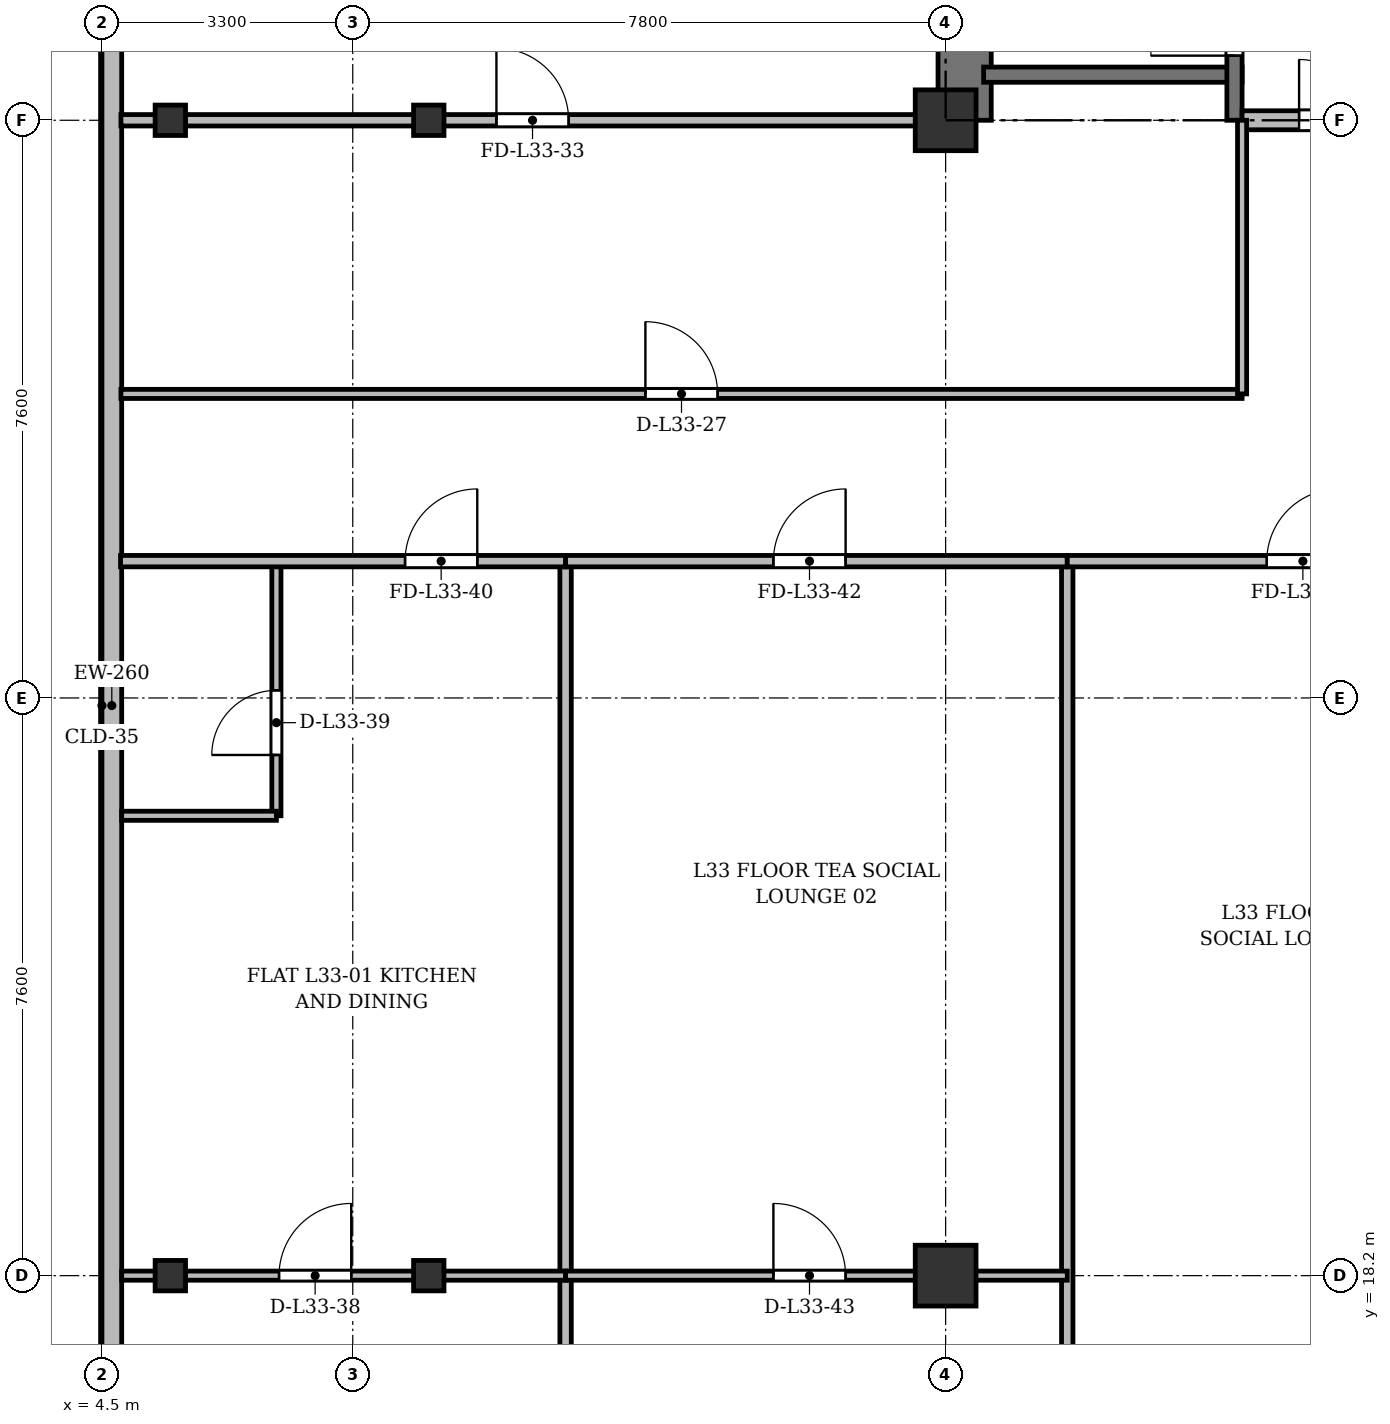
"""IFC4 building model, lengths in metres.
Left out: names, types, materials, properties, quantities, classifications, styles, units other than length and angle.
Written with IfcOpenShell. Run it as: python <this file> out.ifc"""

import sys

from ifc_helpers import new_model, si_unit, direction, frame, frame_2d, origin, origin_2d, place, context, subcontext, project, spatial, rectangle, i_section, extrude, source, transform, mapped, element, fill, save


model = new_model("IFC4")
c1 = context("Model", 3, precision=1e-05, world=origin(), true_north=direction((0.0, 1.0)))
c2 = subcontext(c1, "Body", "Model", "MODEL_VIEW")
j1 = project(units=[si_unit("LENGTHUNIT", "METRE"), si_unit("PLANEANGLEUNIT", "RADIAN")], contexts=[c1])
p1 = place(None, origin())
s1 = spatial("IfcSite", under=j1, at=p1, CompositionType="ELEMENT")
p2 = place(p1, origin())
s2 = spatial("IfcBuilding", under=s1, at=p2, CompositionType="ELEMENT")
p3 = place(p2, frame((0.0, 0.0, 128.5)))
s3 = spatial("IfcBuildingStorey", under=s2, at=p3, CompositionType="ELEMENT", Elevation=128.5)
m1 = source(origin(), c2, "Body", "SweptSolid", [
    extrude(i_section(OverallWidth=0.4, OverallDepth=0.4, WebThickness=0.022, FlangeThickness=0.035, at=origin_2d()), origin(), (0.0, 0.0, 1.0), 3.6),
])
for number, where, z_axis, x_axis in (
    (1, (5.4, 18.2, 0.0), (0.0, 0.0, 1.0), (1.0, 0.0, 0.0)),
    (2, (5.4, 33.4, 0.0), (0.0, 0.0, 1.0), (1.0, 0.0, 0.0)),
    (3, (8.8, 18.2, 0.0), (0.0, 0.0, 1.0), (1.0, 0.0, 0.0)),
    (4, (8.8, 33.4, 0.0), (0.0, 0.0, 1.0), (1.0, 0.0, 0.0)),
):
    element("IfcColumn", number, at=place(p3, frame(where, z_axis=z_axis, x_axis=x_axis)), inside=s3, PredefinedType="COLUMN", context=c2, shape_type="MappedRepresentation", body=[
        mapped(m1, transform((0.0, 0.0, 0.0), x_axis=(1.0, 0.0, 0.0), y_axis=(0.0, 1.0, 0.0), z_axis=(0.0, 0.0, 1.0), scale=1.0)),
    ])
m2 = source(origin(), c2, "Body", "SweptSolid", [
    extrude(rectangle(XDim=0.8, YDim=0.8, at=origin_2d()), origin(), (0.0, 0.0, 1.0), 3.6),
])
for number, where, z_axis, x_axis in (
    (5, (15.6, 18.2, 0.0), (0.0, 0.0, 1.0), (1.0, 0.0, 0.0)),
    (6, (15.6, 33.4, 0.0), (0.0, 0.0, 1.0), (1.0, 0.0, 0.0)),
):
    element("IfcColumn", number, at=place(p3, frame(where, z_axis=z_axis, x_axis=x_axis)), inside=s3, PredefinedType="COLUMN", context=c2, shape_type="MappedRepresentation", body=[
        mapped(m2, transform((0.0, 0.0, 0.0), x_axis=(1.0, 0.0, 0.0), y_axis=(0.0, 1.0, 0.0), z_axis=(0.0, 0.0, 1.0), scale=1.0)),
    ])
p4 = place(p3, frame((4.63, 5.9, 0.0), z_axis=(0.0, 0.0, 1.0), x_axis=(0.0, 1.0, 0.0)))
e7 = element("IfcWall", 7, at=p4, inside=s3, PredefinedType="SOLIDWALL", context=c2, shape_type="SweptSolid", body=[
    extrude(rectangle(XDim=39.6, YDim=0.26, at=frame_2d((19.8, 0.0))), origin(), (0.0, 0.0, 1.0), 2.632),
])
p5 = place(p4, frame((1.45, 0.0, 0.92)))
e8 = element("IfcOpeningElement", 8, at=p5, cuts=e7, PredefinedType="OPENING", context=c2, shape_type="SweptSolid", body=[
    extrude(rectangle(XDim=1.2, YDim=1.61, at=frame_2d((0.6, 0.805))), frame((0.0, 0.14, 0.0), z_axis=(0.0, -1.0, 0.0), x_axis=(1.0, 0.0, 0.0)), (0.0, 0.0, 1.0), 0.28),
])
p6 = place(p4, frame((4.3, 0.0, 0.92)))
e9 = element("IfcOpeningElement", 9, at=p6, cuts=e7, PredefinedType="OPENING", context=c2, shape_type="SweptSolid", body=[
    extrude(rectangle(XDim=2.4, YDim=1.61, at=frame_2d((1.2, 0.805))), frame((0.0, 0.14, 0.0), z_axis=(0.0, -1.0, 0.0), x_axis=(1.0, 0.0, 0.0)), (0.0, 0.0, 1.0), 0.28),
])
p7 = place(p4, frame((8.5, 0.0, 0.92)))
e10 = element("IfcOpeningElement", 10, at=p7, cuts=e7, PredefinedType="OPENING", context=c2, shape_type="SweptSolid", body=[
    extrude(rectangle(XDim=2.4, YDim=1.61, at=frame_2d((1.2, 0.805))), frame((0.0, 0.14, 0.0), z_axis=(0.0, -1.0, 0.0), x_axis=(1.0, 0.0, 0.0)), (0.0, 0.0, 1.0), 0.28),
])
p8 = place(p4, frame((29.7, 0.0, 0.92)))
e11 = element("IfcOpeningElement", 11, at=p8, cuts=e7, PredefinedType="OPENING", context=c2, shape_type="SweptSolid", body=[
    extrude(rectangle(XDim=2.4, YDim=1.61, at=frame_2d((1.2, 0.805))), frame((0.0, 0.14, 0.0), z_axis=(0.0, -1.0, 0.0), x_axis=(1.0, 0.0, 0.0)), (0.0, 0.0, 1.0), 0.28),
])
p9 = place(p4, frame((37.25, 0.0, 0.92)))
e12 = element("IfcOpeningElement", 12, at=p9, cuts=e7, PredefinedType="OPENING", context=c2, shape_type="SweptSolid", body=[
    extrude(rectangle(XDim=1.2, YDim=1.61, at=frame_2d((0.6, 0.805))), frame((0.0, 0.14, 0.0), z_axis=(0.0, -1.0, 0.0), x_axis=(1.0, 0.0, 0.0)), (0.0, 0.0, 1.0), 0.28),
])
p10 = place(p3, frame((15.85, 33.4, 0.0), z_axis=(0.0, 0.0, 1.0), x_axis=(0.0, 1.0, 0.0)))
e13 = element("IfcWall", 13, at=p10, inside=s3, PredefinedType="SHEAR", context=c2, shape_type="SweptSolid", body=[
    extrude(rectangle(XDim=11.7, YDim=0.7, at=frame_2d((5.85, 0.0))), origin(), (0.0, 0.0, 1.0), 3.22),
])
p11 = place(p3, frame((16.1, 34.0, 0.0), z_axis=(0.0, 0.0, 1.0), x_axis=(1.0, 0.0, 0.0)))
e14 = element("IfcWall", 14, at=p11, inside=s3, PredefinedType="SHEAR", context=c2, shape_type="SweptSolid", body=[
    extrude(rectangle(XDim=3.4, YDim=0.2, at=frame_2d((1.7, 0.0))), origin(), (0.0, 0.0, 1.0), 3.22),
])
p12 = place(p3, frame((19.4, 33.4, 0.0), z_axis=(0.0, 0.0, 1.0), x_axis=(0.0, 1.0, 0.0)))
e15 = element("IfcWall", 15, at=p12, inside=s3, PredefinedType="SHEAR", context=c2, shape_type="SweptSolid", body=[
    extrude(rectangle(XDim=11.1, YDim=0.2, at=frame_2d((5.55, 0.0))), origin(), (0.0, 0.0, 1.0), 3.22),
])
p13 = place(p12, frame((0.85, 0.0, 0.0)))
e16 = element("IfcOpeningElement", 16, at=p13, cuts=e15, PredefinedType="OPENING", context=c2, shape_type="SweptSolid", body=[
    extrude(rectangle(XDim=1.1, YDim=2.15, at=frame_2d((0.55, 1.075))), frame((0.0, 0.11, 0.0), z_axis=(0.0, -1.0, 0.0), x_axis=(1.0, 0.0, 0.0)), (0.0, 0.0, 1.0), 0.22),
])
p14 = place(p3, frame((19.5, 33.4, 0.0), z_axis=(0.0, 0.0, 1.0), x_axis=(1.0, 0.0, 0.0)))
e17 = element("IfcWall", 17, at=p14, inside=s3, PredefinedType="PARTITIONING", context=c2, shape_type="SweptSolid", body=[
    extrude(rectangle(XDim=6.8, YDim=0.25, at=frame_2d((3.4, 0.0))), origin(), (0.0, 0.0, 1.0), 2.632),
])
p15 = place(p14, frame((0.75, 0.0, 0.0)))
e18 = element("IfcOpeningElement", 18, at=p15, cuts=e17, PredefinedType="OPENING", context=c2, shape_type="SweptSolid", body=[
    extrude(rectangle(XDim=1.6, YDim=2.2, at=frame_2d((0.8, 1.1))), frame((0.0, 0.135, 0.0), z_axis=(0.0, -1.0, 0.0), x_axis=(1.0, 0.0, 0.0)), (0.0, 0.0, 1.0), 0.27),
])
p16 = place(p3, frame((4.75, 29.8, 0.0), z_axis=(0.0, 0.0, 1.0), x_axis=(1.0, 0.0, 0.0)))
e19 = element("IfcWall", 19, at=p16, inside=s3, PredefinedType="PARTITIONING", context=c2, shape_type="SweptSolid", body=[
    extrude(rectangle(XDim=14.75, YDim=0.12, at=frame_2d((7.375, 0.0))), origin(), (0.0, 0.0, 1.0), 2.72),
])
p17 = place(p16, frame((6.9, 0.0, 0.0)))
e20 = element("IfcOpeningElement", 20, at=p17, cuts=e19, PredefinedType="OPENING", context=c2, shape_type="SweptSolid", body=[
    extrude(rectangle(XDim=0.95, YDim=2.15, at=frame_2d((0.475, 1.075))), frame((0.0, 0.07, 0.0), z_axis=(0.0, -1.0, 0.0), x_axis=(1.0, 0.0, 0.0)), (0.0, 0.0, 1.0), 0.14),
])
p18 = place(p3, frame((19.5, 29.8, 0.0), z_axis=(0.0, 0.0, 1.0), x_axis=(0.0, 1.0, 0.0)))
e21 = element("IfcWall", 21, at=p18, inside=s3, PredefinedType="PARTITIONING", context=c2, shape_type="SweptSolid", body=[
    extrude(rectangle(XDim=3.6, YDim=0.12, at=frame_2d((1.8, 0.0))), origin(), (0.0, 0.0, 1.0), 2.632),
])
p19 = place(p3, frame((4.75, 33.4, 0.0), z_axis=(0.0, 0.0, 1.0), x_axis=(1.0, 0.0, 0.0)))
e22 = element("IfcWall", 22, at=p19, inside=s3, PredefinedType="PARTITIONING", context=c2, shape_type="SweptSolid", body=[
    extrude(rectangle(XDim=10.85, YDim=0.15, at=frame_2d((5.425, 0.0))), origin(), (0.0, 0.0, 1.0), 2.632),
])
p20 = place(p19, frame((4.94, 0.0, 0.0)))
e23 = element("IfcOpeningElement", 23, at=p20, cuts=e22, PredefinedType="OPENING", context=c2, shape_type="SweptSolid", body=[
    extrude(rectangle(XDim=0.95, YDim=2.15, at=frame_2d((0.475, 1.075))), frame((0.0, 0.085, 0.0), z_axis=(0.0, -1.0, 0.0), x_axis=(1.0, 0.0, 0.0)), (0.0, 0.0, 1.0), 0.17),
])
for number, where, z_axis, x_axis in (
    (24, (10.6, 3.145, 0.0), (0.0, 0.0, 1.0), (0.0, 1.0, 0.0)),
    (25, (17.2, 3.145, 0.0), (0.0, 0.0, 1.0), (0.0, 1.0, 0.0)),
):
    element("IfcWall", number, at=place(p3, frame(where, z_axis=z_axis, x_axis=x_axis)), inside=s3, PredefinedType="PARTITIONING", context=c2, shape_type="SweptSolid", body=[
        extrude(rectangle(XDim=24.455, YDim=0.15, at=frame_2d((12.228, 0.0))), origin(), (0.0, 0.0, 1.0), 2.632),
    ])
p21 = place(p3, frame((4.76, 18.2, 0.0), z_axis=(0.0, 0.0, 1.0), x_axis=(1.0, 0.0, 0.0)))
e26 = element("IfcWall", 26, at=p21, inside=s3, PredefinedType="PARTITIONING", context=c2, shape_type="SweptSolid", body=[
    extrude(rectangle(XDim=5.84, YDim=0.12, at=frame_2d((2.92, 0.0))), origin(), (0.0, 0.0, 1.0), 2.632),
])
p22 = place(p21, frame((2.07, 0.0, 0.0)))
e27 = element("IfcOpeningElement", 27, at=p22, cuts=e26, PredefinedType="OPENING", context=c2, shape_type="SweptSolid", body=[
    extrude(rectangle(XDim=0.95, YDim=2.15, at=frame_2d((0.475, 1.075))), frame((0.0, 0.07, 0.0), z_axis=(0.0, -1.0, 0.0), x_axis=(1.0, 0.0, 0.0)), (0.0, 0.0, 1.0), 0.14),
])
p23 = place(p3, frame((6.796, 24.25, 0.0), z_axis=(0.0, 0.0, 1.0), x_axis=(0.0, 1.0, 0.0)))
e28 = element("IfcWall", 28, at=p23, inside=s3, PredefinedType="PARTITIONING", context=c2, shape_type="SweptSolid", body=[
    extrude(rectangle(XDim=3.35, YDim=0.12, at=frame_2d((1.675, 0.0))), origin(), (0.0, 0.0, 1.0), 2.87),
])
p24 = place(p23, frame((0.8, 0.0, 0.0)))
e29 = element("IfcOpeningElement", 29, at=p24, cuts=e28, PredefinedType="OPENING", context=c2, shape_type="SweptSolid", body=[
    extrude(rectangle(XDim=0.85, YDim=2.1, at=frame_2d((0.425, 1.05))), frame((0.0, 0.07, 0.0), z_axis=(0.0, -1.0, 0.0), x_axis=(1.0, 0.0, 0.0)), (0.0, 0.0, 1.0), 0.14),
])
p25 = place(p3, frame((4.76, 24.25, 0.0), z_axis=(0.0, 0.0, 1.0), x_axis=(1.0, 0.0, 0.0)))
e30 = element("IfcWall", 30, at=p25, inside=s3, PredefinedType="PARTITIONING", context=c2, shape_type="SweptSolid", body=[
    extrude(rectangle(XDim=2.036, YDim=0.12, at=frame_2d((1.018, 0.0))), origin(), (0.0, 0.0, 1.0), 2.72),
])
p26 = place(p3, frame((4.745, 27.6, 0.0), z_axis=(0.0, 0.0, 1.0), x_axis=(1.0, 0.0, 0.0)))
e31 = element("IfcWall", 31, at=p26, inside=s3, PredefinedType="PARTITIONING", context=c2, shape_type="SweptSolid", body=[
    extrude(rectangle(XDim=5.855, YDim=0.15, at=frame_2d((2.927, 0.0))), origin(), (0.0, 0.0, 1.0), 2.72),
])
p27 = place(p26, frame((3.743, 0.0, 0.0)))
e32 = element("IfcOpeningElement", 32, at=p27, cuts=e31, PredefinedType="OPENING", context=c2, shape_type="SweptSolid", body=[
    extrude(rectangle(XDim=0.95, YDim=2.15, at=frame_2d((0.475, 1.075))), frame((0.0, 0.085, 0.0), z_axis=(0.0, -1.0, 0.0), x_axis=(1.0, 0.0, 0.0)), (0.0, 0.0, 1.0), 0.17),
])
p28 = place(p3, frame((10.6, 27.6, 0.0), z_axis=(0.0, 0.0, 1.0), x_axis=(1.0, 0.0, 0.0)))
e33 = element("IfcWall", 33, at=p28, inside=s3, PredefinedType="PARTITIONING", context=c2, shape_type="SweptSolid", body=[
    extrude(rectangle(XDim=6.6, YDim=0.15, at=frame_2d((3.3, 0.0))), origin(), (0.0, 0.0, 1.0), 2.72),
])
p29 = place(p28, frame((2.734, 0.0, 0.0)))
e34 = element("IfcOpeningElement", 34, at=p29, cuts=e33, PredefinedType="OPENING", context=c2, shape_type="SweptSolid", body=[
    extrude(rectangle(XDim=0.95, YDim=2.15, at=frame_2d((0.475, 1.075))), frame((0.0, 0.085, 0.0), z_axis=(0.0, -1.0, 0.0), x_axis=(1.0, 0.0, 0.0)), (0.0, 0.0, 1.0), 0.17),
])
p30 = place(p3, frame((10.6, 18.2, 0.0), z_axis=(0.0, 0.0, 1.0), x_axis=(1.0, 0.0, 0.0)))
e35 = element("IfcWall", 35, at=p30, inside=s3, PredefinedType="PARTITIONING", context=c2, shape_type="SweptSolid", body=[
    extrude(rectangle(XDim=6.6, YDim=0.12, at=frame_2d((3.3, 0.0))), origin(), (0.0, 0.0, 1.0), 2.632),
])
p31 = place(p30, frame((2.734, 0.0, 0.0)))
e36 = element("IfcOpeningElement", 36, at=p31, cuts=e35, PredefinedType="OPENING", context=c2, shape_type="SweptSolid", body=[
    extrude(rectangle(XDim=0.95, YDim=2.15, at=frame_2d((0.475, 1.075))), frame((0.0, 0.07, 0.0), z_axis=(0.0, -1.0, 0.0), x_axis=(1.0, 0.0, 0.0)), (0.0, 0.0, 1.0), 0.14),
])
p32 = place(p3, frame((17.2, 27.6, 0.0), z_axis=(0.0, 0.0, 1.0), x_axis=(1.0, 0.0, 0.0)))
e37 = element("IfcWall", 37, at=p32, inside=s3, PredefinedType="PARTITIONING", context=c2, shape_type="SweptSolid", body=[
    extrude(rectangle(XDim=6.2, YDim=0.15, at=frame_2d((3.1, 0.0))), origin(), (0.0, 0.0, 1.0), 2.72),
])
p33 = place(p32, frame((2.625, 0.0, 0.0)))
e38 = element("IfcOpeningElement", 38, at=p33, cuts=e37, PredefinedType="OPENING", context=c2, shape_type="SweptSolid", body=[
    extrude(rectangle(XDim=0.95, YDim=2.15, at=frame_2d((0.475, 1.075))), frame((0.0, 0.085, 0.0), z_axis=(0.0, -1.0, 0.0), x_axis=(1.0, 0.0, 0.0)), (0.0, 0.0, 1.0), 0.17),
])
m3 = source(origin(), c2, "Body", "SweptSolid", [
    extrude(rectangle(XDim=1.1, YDim=2.15, at=frame_2d((0.55, 1.075))), frame((0.0, 0.025, 0.0), z_axis=(0.0, -1.0, 0.0), x_axis=(1.0, 0.0, 0.0)), (0.0, 0.0, 1.0), 0.05),
])
p34 = place(p13, origin())
e39 = element("IfcDoor", 39, at=p34, inside=s3, OperationType="SINGLE_SWING_LEFT", PredefinedType="DOOR", context=c2, shape_type="MappedRepresentation", body=[
    mapped(m3, transform((0.0, 0.0, 0.0), x_axis=(1.0, 0.0, 0.0), y_axis=(0.0, 1.0, 0.0), z_axis=(0.0, 0.0, 1.0), scale=1.0)),
])
fill(e16, e39)
m4 = source(origin(), c2, "Body", "SweptSolid", [
    extrude(rectangle(XDim=1.6, YDim=2.2, at=frame_2d((0.8, 1.1))), frame((0.0, 0.025, 0.0), z_axis=(0.0, -1.0, 0.0), x_axis=(1.0, 0.0, 0.0)), (0.0, 0.0, 1.0), 0.05),
])
p35 = place(p15, origin())
e40 = element("IfcDoor", 40, at=p35, inside=s3, OperationType="DOUBLE_DOOR_SINGLE_SWING", PredefinedType="DOOR", context=c2, shape_type="MappedRepresentation", body=[
    mapped(m4, transform((0.0, 0.0, 0.0), x_axis=(1.0, 0.0, 0.0), y_axis=(0.0, 1.0, 0.0), z_axis=(0.0, 0.0, 1.0), scale=1.0)),
])
fill(e18, e40)
m5 = source(origin(), c2, "Body", "SweptSolid", [
    extrude(rectangle(XDim=0.95, YDim=2.15, at=frame_2d((0.475, 1.075))), frame((0.0, 0.025, 0.0), z_axis=(0.0, -1.0, 0.0), x_axis=(1.0, 0.0, 0.0)), (0.0, 0.0, 1.0), 0.05),
])
p36 = place(p17, origin())
e41 = element("IfcDoor", 41, at=p36, inside=s3, OperationType="SINGLE_SWING_LEFT", PredefinedType="DOOR", context=c2, shape_type="MappedRepresentation", body=[
    mapped(m5, transform((0.0, 0.0, 0.0), x_axis=(1.0, 0.0, 0.0), y_axis=(0.0, 1.0, 0.0), z_axis=(0.0, 0.0, 1.0), scale=1.0)),
])
fill(e20, e41)
p37 = place(p20, origin())
e42 = element("IfcDoor", 42, at=p37, inside=s3, OperationType="SINGLE_SWING_LEFT", PredefinedType="DOOR", context=c2, shape_type="MappedRepresentation", body=[
    mapped(m5, transform((0.0, 0.0, 0.0), x_axis=(1.0, 0.0, 0.0), y_axis=(0.0, 1.0, 0.0), z_axis=(0.0, 0.0, 1.0), scale=1.0)),
])
fill(e23, e42)
p38 = place(p22, origin())
e43 = element("IfcDoor", 43, at=p38, inside=s3, OperationType="SINGLE_SWING_RIGHT", PredefinedType="DOOR", context=c2, shape_type="MappedRepresentation", body=[
    mapped(m5, transform((0.0, 0.0, 0.0), x_axis=(1.0, 0.0, 0.0), y_axis=(0.0, 1.0, 0.0), z_axis=(0.0, 0.0, 1.0), scale=1.0)),
])
fill(e27, e43)
m6 = source(origin(), c2, "Body", "SweptSolid", [
    extrude(rectangle(XDim=0.85, YDim=2.1, at=frame_2d((0.425, 1.05))), frame((0.0, 0.025, 0.0), z_axis=(0.0, -1.0, 0.0), x_axis=(1.0, 0.0, 0.0)), (0.0, 0.0, 1.0), 0.05),
])
p39 = place(p24, origin())
e44 = element("IfcDoor", 44, at=p39, inside=s3, OperationType="SINGLE_SWING_LEFT", PredefinedType="DOOR", context=c2, shape_type="MappedRepresentation", body=[
    mapped(m6, transform((0.0, 0.0, 0.0), x_axis=(1.0, 0.0, 0.0), y_axis=(0.0, 1.0, 0.0), z_axis=(0.0, 0.0, 1.0), scale=1.0)),
])
fill(e29, e44)
p40 = place(p27, origin())
e45 = element("IfcDoor", 45, at=p40, inside=s3, OperationType="SINGLE_SWING_RIGHT", PredefinedType="DOOR", context=c2, shape_type="MappedRepresentation", body=[
    mapped(m5, transform((0.0, 0.0, 0.0), x_axis=(1.0, 0.0, 0.0), y_axis=(0.0, 1.0, 0.0), z_axis=(0.0, 0.0, 1.0), scale=1.0)),
])
fill(e32, e45)
p41 = place(p29, origin())
e46 = element("IfcDoor", 46, at=p41, inside=s3, OperationType="SINGLE_SWING_RIGHT", PredefinedType="DOOR", context=c2, shape_type="MappedRepresentation", body=[
    mapped(m5, transform((0.0, 0.0, 0.0), x_axis=(1.0, 0.0, 0.0), y_axis=(0.0, 1.0, 0.0), z_axis=(0.0, 0.0, 1.0), scale=1.0)),
])
fill(e34, e46)
p42 = place(p31, origin())
e47 = element("IfcDoor", 47, at=p42, inside=s3, OperationType="SINGLE_SWING_LEFT", PredefinedType="DOOR", context=c2, shape_type="MappedRepresentation", body=[
    mapped(m5, transform((0.0, 0.0, 0.0), x_axis=(1.0, 0.0, 0.0), y_axis=(0.0, 1.0, 0.0), z_axis=(0.0, 0.0, 1.0), scale=1.0)),
])
fill(e36, e47)
p43 = place(p33, origin())
e48 = element("IfcDoor", 48, at=p43, inside=s3, OperationType="SINGLE_SWING_RIGHT", PredefinedType="DOOR", context=c2, shape_type="MappedRepresentation", body=[
    mapped(m5, transform((0.0, 0.0, 0.0), x_axis=(1.0, 0.0, 0.0), y_axis=(0.0, 1.0, 0.0), z_axis=(0.0, 0.0, 1.0), scale=1.0)),
])
fill(e38, e48)
save(model, sys.argv[1])
